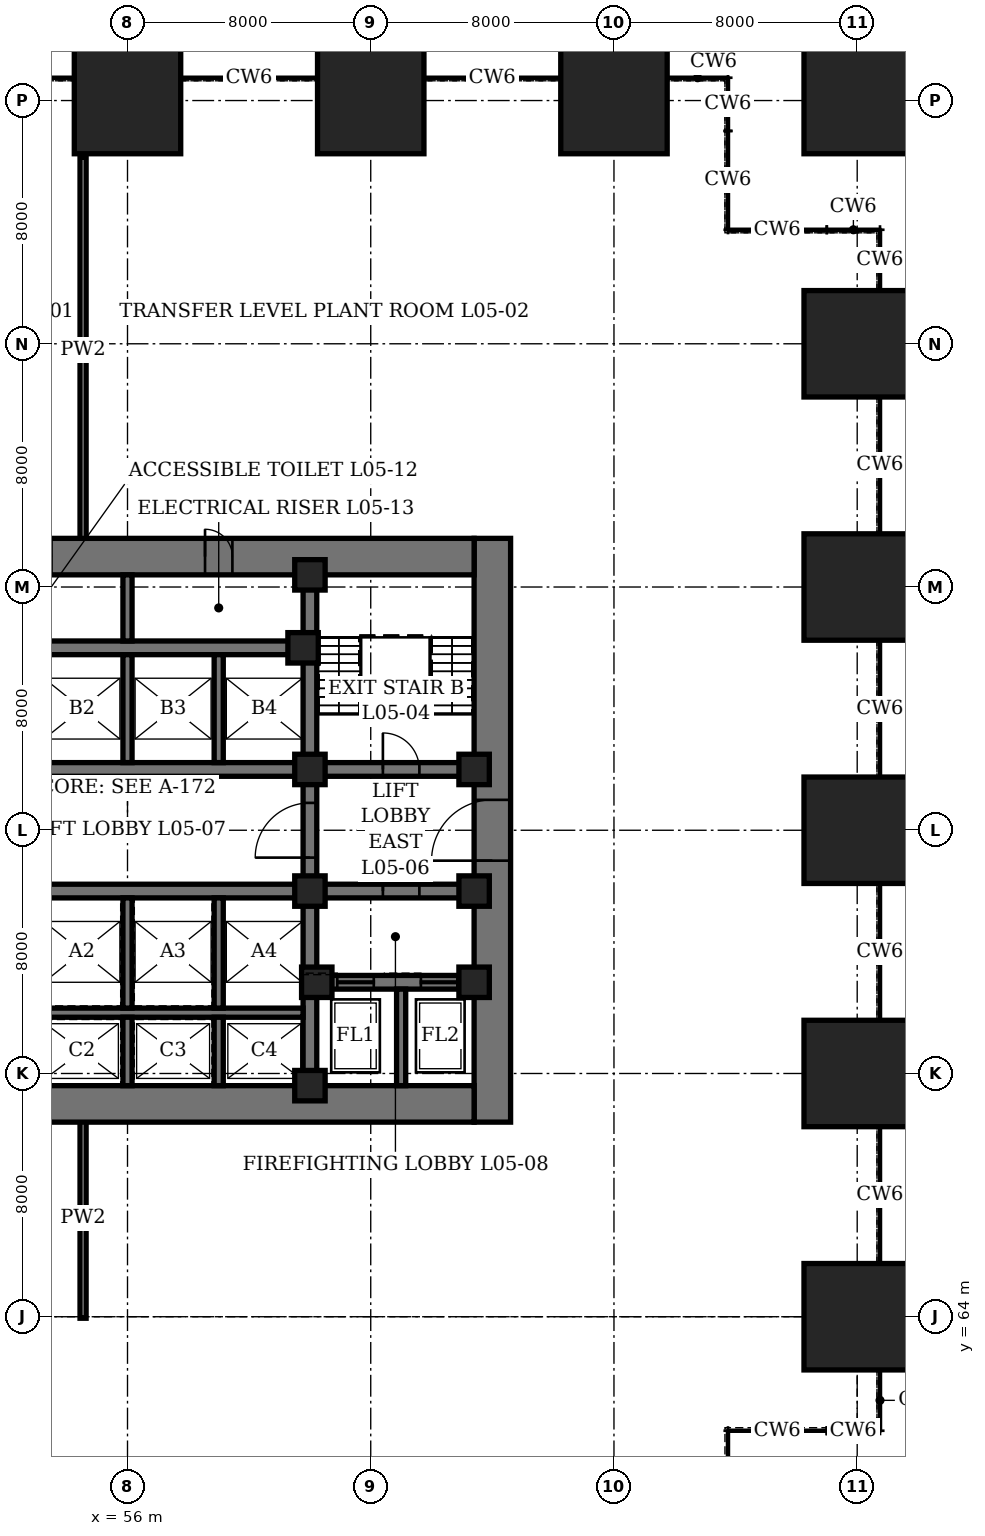
"""IFC4 building model, lengths in metres.
Left out: names, types, materials, properties, quantities, classifications, styles, units other than length and angle.
Written with IfcOpenShell. Run it as: python <this file> out.ifc"""

import sys

from ifc_helpers import new_model, si_unit, direction, frame, frame_2d, origin, origin_2d, place, context, subcontext, project, spatial, rectangle, hollow_rectangle, extrude, element, fill, save


model = new_model("IFC4")
c1 = context("Model", 3, precision=1e-05, world=origin(), true_north=direction((0.0, 1.0)))
c2 = subcontext(c1, "Body", "Model", "MODEL_VIEW")
j1 = project(units=[si_unit("LENGTHUNIT", "METRE"), si_unit("PLANEANGLEUNIT", "RADIAN")], contexts=[c1])
p1 = place(None, origin())
s1 = spatial("IfcSite", under=j1, at=p1, CompositionType="ELEMENT")
p2 = place(p1, origin())
s2 = spatial("IfcBuilding", under=s1, at=p2, CompositionType="ELEMENT")
p3 = place(p2, frame((0.0, 0.0, 25.9)))
s3 = spatial("IfcBuildingStorey", under=s2, at=p3, CompositionType="ELEMENT", Elevation=25.9)
for number, where, z_axis, x_axis in (
    (1, (56.0, 104.0, 0.0), (0.0, 0.0, 1.0), (1.0, 0.0, 0.0)),
    (2, (64.0, 104.0, 0.0), (0.0, 0.0, 1.0), (1.0, 0.0, 0.0)),
    (3, (72.0, 104.0, 0.0), (0.0, 0.0, 1.0), (1.0, 0.0, 0.0)),
    (4, (80.0, 64.0, 0.0), (0.0, 0.0, 1.0), (1.0, 0.0, 0.0)),
    (5, (80.0, 72.0, 0.0), (0.0, 0.0, 1.0), (1.0, 0.0, 0.0)),
    (6, (80.0, 80.0, 0.0), (0.0, 0.0, 1.0), (1.0, 0.0, 0.0)),
    (7, (80.0, 88.0, 0.0), (0.0, 0.0, 1.0), (1.0, 0.0, 0.0)),
    (8, (80.0, 96.0, 0.0), (0.0, 0.0, 1.0), (1.0, 0.0, 0.0)),
    (9, (80.0, 104.0, 0.0), (0.0, 0.0, 1.0), (1.0, 0.0, 0.0)),
):
    element("IfcColumn", number, at=place(p3, frame(where, z_axis=z_axis, x_axis=x_axis)), inside=s3, PredefinedType="COLUMN", context=c2, shape_type="SweptSolid", body=[
        extrude(hollow_rectangle(XDim=3.5, YDim=3.5, WallThickness=0.5, at=origin_2d()), origin(), (0.0, 0.0, 1.0), 8.7),
    ])
p4 = place(p3, frame((68.0, 70.4, 0.0), z_axis=(0.0, 0.0, 1.0), x_axis=(0.0, 1.0, 0.0)))
e10 = element("IfcWall", 10, at=p4, inside=s3, PredefinedType="SHEAR", context=c2, shape_type="SweptSolid", body=[
    extrude(rectangle(XDim=19.2, YDim=1.2, at=frame_2d((9.6, 0.0))), origin(), (0.0, 0.0, 1.0), 9.0),
])
p5 = place(p4, frame((8.6, 0.0, 0.0)))
e11 = element("IfcOpeningElement", 11, at=p5, cuts=e10, PredefinedType="OPENING", context=c2, shape_type="SweptSolid", body=[
    extrude(rectangle(XDim=2.0, YDim=2.4, at=frame_2d((1.0, 1.2))), frame((0.0, 0.61, 0.0), z_axis=(0.0, -1.0, 0.0), x_axis=(1.0, 0.0, 0.0)), (0.0, 0.0, 1.0), 1.22),
])
p6 = place(p3, frame((44.6, 71.0, 0.0), z_axis=(0.0, 0.0, 1.0), x_axis=(1.0, 0.0, 0.0)))
e12 = element("IfcWall", 12, at=p6, inside=s3, PredefinedType="SHEAR", context=c2, shape_type="SweptSolid", body=[
    extrude(rectangle(XDim=22.8, YDim=1.2, at=frame_2d((11.4, 0.0))), origin(), (0.0, 0.0, 1.0), 9.0),
])
p7 = place(p3, frame((44.6, 89.0, 0.0), z_axis=(0.0, 0.0, 1.0), x_axis=(1.0, 0.0, 0.0)))
e13 = element("IfcWall", 13, at=p7, inside=s3, PredefinedType="SHEAR", context=c2, shape_type="SweptSolid", body=[
    extrude(rectangle(XDim=22.8, YDim=1.2, at=frame_2d((11.4, 0.0))), origin(), (0.0, 0.0, 1.0), 9.0),
])
p8 = place(p7, frame((7.9, 0.0, 0.0)))
e14 = element("IfcOpeningElement", 14, at=p8, cuts=e13, PredefinedType="OPENING", context=c2, shape_type="SweptSolid", body=[
    extrude(rectangle(XDim=1.0, YDim=2.1, at=frame_2d((0.5, 1.05))), frame((0.0, 0.61, 0.0), z_axis=(0.0, -1.0, 0.0), x_axis=(1.0, 0.0, 0.0)), (0.0, 0.0, 1.0), 1.22),
])
p9 = place(p7, frame((13.95, 0.0, 0.0)))
e15 = element("IfcOpeningElement", 15, at=p9, cuts=e13, PredefinedType="OPENING", context=c2, shape_type="SweptSolid", body=[
    extrude(rectangle(XDim=0.9, YDim=2.1, at=frame_2d((0.45, 1.05))), frame((0.0, 0.61, 0.0), z_axis=(0.0, -1.0, 0.0), x_axis=(1.0, 0.0, 0.0)), (0.0, 0.0, 1.0), 1.22),
])
p10 = place(p3, frame((62.0, 71.6, 0.0), z_axis=(0.0, 0.0, 1.0), x_axis=(0.0, 1.0, 0.0)))
e16 = element("IfcWall", 16, at=p10, inside=s3, PredefinedType="SHEAR", context=c2, shape_type="SweptSolid", body=[
    extrude(rectangle(XDim=16.8, YDim=0.45, at=frame_2d((8.4, 0.0))), origin(), (0.0, 0.0, 1.0), 9.0),
])
p11 = place(p10, frame((7.5, 0.0, 0.0)))
e17 = element("IfcOpeningElement", 17, at=p11, cuts=e16, PredefinedType="OPENING", context=c2, shape_type="SweptSolid", body=[
    extrude(rectangle(XDim=1.8, YDim=2.4, at=frame_2d((0.9, 1.2))), frame((0.0, 0.235, 0.0), z_axis=(0.0, -1.0, 0.0), x_axis=(1.0, 0.0, 0.0)), (0.0, 0.0, 1.0), 0.47),
])
p12 = place(p3, frame((62.225, 75.0, 0.0), z_axis=(0.0, 0.0, 1.0), x_axis=(1.0, 0.0, 0.0)))
e18 = element("IfcWall", 18, at=p12, inside=s3, PredefinedType="SHEAR", context=c2, shape_type="SweptSolid", body=[
    extrude(rectangle(XDim=5.175, YDim=0.45, at=frame_2d((2.587, 0.0))), origin(), (0.0, 0.0, 1.0), 9.0),
])
p13 = place(p12, frame((0.675, 0.0, 0.0)))
e19 = element("IfcOpeningElement", 19, at=p13, cuts=e18, PredefinedType="OPENING", context=c2, shape_type="SweptSolid", body=[
    extrude(rectangle(XDim=1.2, YDim=2.2, at=frame_2d((0.6, 1.1))), frame((0.0, 0.235, 0.0), z_axis=(0.0, -1.0, 0.0), x_axis=(1.0, 0.0, 0.0)), (0.0, 0.0, 1.0), 0.47),
])
p14 = place(p12, frame((3.425, 0.0, 0.0)))
e20 = element("IfcOpeningElement", 20, at=p14, cuts=e18, PredefinedType="OPENING", context=c2, shape_type="SweptSolid", body=[
    extrude(rectangle(XDim=1.2, YDim=2.2, at=frame_2d((0.6, 1.1))), frame((0.0, 0.235, 0.0), z_axis=(0.0, -1.0, 0.0), x_axis=(1.0, 0.0, 0.0)), (0.0, 0.0, 1.0), 0.47),
])
p15 = place(p3, frame((62.225, 78.0, 0.0), z_axis=(0.0, 0.0, 1.0), x_axis=(1.0, 0.0, 0.0)))
e21 = element("IfcWall", 21, at=p15, inside=s3, PredefinedType="SHEAR", context=c2, shape_type="SweptSolid", body=[
    extrude(rectangle(XDim=5.175, YDim=0.45, at=frame_2d((2.587, 0.0))), origin(), (0.0, 0.0, 1.0), 9.0),
])
p16 = place(p15, frame((2.175, 0.0, 0.0)))
e22 = element("IfcOpeningElement", 22, at=p16, cuts=e21, PredefinedType="OPENING", context=c2, shape_type="SweptSolid", body=[
    extrude(rectangle(XDim=1.2, YDim=2.1, at=frame_2d((0.6, 1.05))), frame((0.0, 0.235, 0.0), z_axis=(0.0, -1.0, 0.0), x_axis=(1.0, 0.0, 0.0)), (0.0, 0.0, 1.0), 0.47),
])
p17 = place(p3, frame((62.225, 82.0, 0.0), z_axis=(0.0, 0.0, 1.0), x_axis=(1.0, 0.0, 0.0)))
e23 = element("IfcWall", 23, at=p17, inside=s3, PredefinedType="SHEAR", context=c2, shape_type="SweptSolid", body=[
    extrude(rectangle(XDim=5.175, YDim=0.45, at=frame_2d((2.587, 0.0))), origin(), (0.0, 0.0, 1.0), 9.0),
])
p18 = place(p17, frame((2.175, 0.0, 0.0)))
e24 = element("IfcOpeningElement", 24, at=p18, cuts=e23, PredefinedType="OPENING", context=c2, shape_type="SweptSolid", body=[
    extrude(rectangle(XDim=1.2, YDim=2.1, at=frame_2d((0.6, 1.05))), frame((0.0, 0.235, 0.0), z_axis=(0.0, -1.0, 0.0), x_axis=(1.0, 0.0, 0.0)), (0.0, 0.0, 1.0), 0.47),
])
for number, where, z_axis, x_axis in (
    (25, (50.225, 78.0, 0.0), (0.0, 0.0, 1.0), (1.0, 0.0, 0.0)),
    (26, (50.225, 82.0, 0.0), (0.0, 0.0, 1.0), (1.0, 0.0, 0.0)),
    (27, (50.225, 86.0, 0.0), (0.0, 0.0, 1.0), (1.0, 0.0, 0.0)),
):
    element("IfcWall", number, at=place(p3, frame(where, z_axis=z_axis, x_axis=x_axis)), inside=s3, PredefinedType="SHEAR", context=c2, shape_type="SweptSolid", body=[
        extrude(rectangle(XDim=11.55, YDim=0.45, at=frame_2d((5.775, 0.0))), origin(), (0.0, 0.0, 1.0), 9.0),
    ])
p19 = place(p3, frame((50.225, 74.0, 0.0), z_axis=(0.0, 0.0, 1.0), x_axis=(1.0, 0.0, 0.0)))
e28 = element("IfcWall", 28, at=p19, inside=s3, PredefinedType="SHEAR", context=c2, shape_type="SweptSolid", body=[
    extrude(rectangle(XDim=11.55, YDim=0.3, at=frame_2d((5.775, 0.0))), origin(), (0.0, 0.0, 1.0), 9.0),
])
p20 = place(p3, frame((56.0, 71.6, 0.0), z_axis=(0.0, 0.0, 1.0), x_axis=(0.0, 1.0, 0.0)))
e29 = element("IfcWall", 29, at=p20, inside=s3, PredefinedType="SHEAR", context=c2, shape_type="SweptSolid", body=[
    extrude(rectangle(XDim=2.25, YDim=0.3, at=frame_2d((1.125, 0.0))), origin(), (0.0, 0.0, 1.0), 9.0),
])
p21 = place(p3, frame((56.0, 74.15, 0.0), z_axis=(0.0, 0.0, 1.0), x_axis=(0.0, 1.0, 0.0)))
e30 = element("IfcWall", 30, at=p21, inside=s3, PredefinedType="SHEAR", context=c2, shape_type="SweptSolid", body=[
    extrude(rectangle(XDim=3.625, YDim=0.3, at=frame_2d((1.812, 0.0))), origin(), (0.0, 0.0, 1.0), 9.0),
])
p22 = place(p3, frame((56.0, 82.225, 0.0), z_axis=(0.0, 0.0, 1.0), x_axis=(0.0, 1.0, 0.0)))
e31 = element("IfcWall", 31, at=p22, inside=s3, PredefinedType="SHEAR", context=c2, shape_type="SweptSolid", body=[
    extrude(rectangle(XDim=3.55, YDim=0.3, at=frame_2d((1.775, 0.0))), origin(), (0.0, 0.0, 1.0), 9.0),
])
p23 = place(p3, frame((59.0, 71.6, 0.0), z_axis=(0.0, 0.0, 1.0), x_axis=(0.0, 1.0, 0.0)))
e32 = element("IfcWall", 32, at=p23, inside=s3, PredefinedType="SHEAR", context=c2, shape_type="SweptSolid", body=[
    extrude(rectangle(XDim=2.25, YDim=0.3, at=frame_2d((1.125, 0.0))), origin(), (0.0, 0.0, 1.0), 9.0),
])
p24 = place(p3, frame((59.0, 74.15, 0.0), z_axis=(0.0, 0.0, 1.0), x_axis=(0.0, 1.0, 0.0)))
e33 = element("IfcWall", 33, at=p24, inside=s3, PredefinedType="SHEAR", context=c2, shape_type="SweptSolid", body=[
    extrude(rectangle(XDim=3.625, YDim=0.3, at=frame_2d((1.812, 0.0))), origin(), (0.0, 0.0, 1.0), 9.0),
])
p25 = place(p3, frame((59.0, 82.225, 0.0), z_axis=(0.0, 0.0, 1.0), x_axis=(0.0, 1.0, 0.0)))
e34 = element("IfcWall", 34, at=p25, inside=s3, PredefinedType="SHEAR", context=c2, shape_type="SweptSolid", body=[
    extrude(rectangle(XDim=3.55, YDim=0.3, at=frame_2d((1.775, 0.0))), origin(), (0.0, 0.0, 1.0), 9.0),
])
p26 = place(p3, frame((65.0, 71.6, 0.0), z_axis=(0.0, 0.0, 1.0), x_axis=(0.0, 1.0, 0.0)))
e35 = element("IfcWall", 35, at=p26, inside=s3, PredefinedType="SHEAR", context=c2, shape_type="SweptSolid", body=[
    extrude(rectangle(XDim=3.175, YDim=0.3, at=frame_2d((1.587, 0.0))), origin(), (0.0, 0.0, 1.0), 9.0),
])
p27 = place(p3, frame((56.0, 86.225, 0.0), z_axis=(0.0, 0.0, 1.0), x_axis=(0.0, 1.0, 0.0)))
e36 = element("IfcWall", 36, at=p27, inside=s3, PredefinedType="SHEAR", context=c2, shape_type="SweptSolid", body=[
    extrude(rectangle(XDim=2.175, YDim=0.3, at=frame_2d((1.087, 0.0))), origin(), (0.0, 0.0, 1.0), 9.0),
])
for number, where, z_axis, x_axis in (
    (37, (61.775, 86.0, 0.0), (0.0, 0.0, 1.0), (1.0, 0.0, 0.0)),
    (38, (62.0, 71.6, 0.0), (0.0, 0.0, 1.0), (1.0, 0.0, 0.0)),
    (39, (62.0, 78.0, 0.0), (0.0, 0.0, 1.0), (1.0, 0.0, 0.0)),
    (40, (62.0, 82.0, 0.0), (0.0, 0.0, 1.0), (1.0, 0.0, 0.0)),
    (41, (62.0, 88.4, 0.0), (0.0, 0.0, 1.0), (1.0, 0.0, 0.0)),
    (42, (62.225, 75.0, 0.0), (0.0, 0.0, 1.0), (1.0, 0.0, 0.0)),
    (43, (67.4, 75.0, 0.0), (0.0, 0.0, 1.0), (1.0, 0.0, 0.0)),
    (44, (67.4, 78.0, 0.0), (0.0, 0.0, 1.0), (1.0, 0.0, 0.0)),
    (45, (67.4, 82.0, 0.0), (0.0, 0.0, 1.0), (1.0, 0.0, 0.0)),
):
    element("IfcColumn", number, at=place(p3, frame(where, z_axis=z_axis, x_axis=x_axis)), inside=s3, PredefinedType="COLUMN", context=c2, shape_type="SweptSolid", body=[
        extrude(hollow_rectangle(XDim=1.0, YDim=1.0, WallThickness=0.15, at=origin_2d()), origin(), (0.0, 0.0, 1.0), 9.0),
    ])
p28 = place(p3, frame((54.539, 89.45, 0.0), z_axis=(0.0, 0.0, 1.0), x_axis=(0.0, 1.0, 0.0)))
e46 = element("IfcWall", 46, at=p28, inside=s3, PredefinedType="PARTITIONING", context=c2, shape_type="SweptSolid", body=[
    extrude(rectangle(XDim=12.7, YDim=0.2, at=frame_2d((6.35, 0.0))), origin(), (0.0, 0.0, 1.0), 7.928),
])
p29 = place(p3, frame((54.539, 63.95, 0.0), z_axis=(0.0, 0.0, 1.0), x_axis=(0.0, 1.0, 0.0)))
e47 = element("IfcWall", 47, at=p29, inside=s3, PredefinedType="PARTITIONING", context=c2, shape_type="SweptSolid", body=[
    extrude(rectangle(XDim=6.6, YDim=0.2, at=frame_2d((3.3, 0.0))), origin(), (0.0, 0.0, 1.0), 7.928),
])
p30 = place(p9, origin())
e48 = element("IfcDoor", 48, at=p30, inside=s3, OperationType="SINGLE_SWING_LEFT", PredefinedType="DOOR", context=c2, shape_type="SweptSolid", body=[
    extrude(rectangle(XDim=0.9, YDim=2.1, at=frame_2d((0.45, 1.05))), frame((0.0, 0.35, 0.0), z_axis=(0.0, -1.0, 0.0), x_axis=(1.0, 0.0, 0.0)), (0.0, 0.0, 1.0), 0.7),
])
fill(e15, e48)
p31 = place(p18, origin())
e49 = element("IfcDoor", 49, at=p31, inside=s3, OperationType="SINGLE_SWING_LEFT", PredefinedType="DOOR", context=c2, shape_type="SweptSolid", body=[
    extrude(rectangle(XDim=1.2, YDim=2.1, at=frame_2d((0.6, 1.05))), frame((0.0, 0.225, 0.0), z_axis=(0.0, -1.0, 0.0), x_axis=(1.0, 0.0, 0.0)), (0.0, 0.0, 1.0), 0.449),
])
fill(e24, e49)
p32 = place(p5, origin())
e50 = element("IfcDoor", 50, at=p32, inside=s3, OperationType="DOUBLE_DOOR_SINGLE_SWING", PredefinedType="DOOR", context=c2, shape_type="SweptSolid", body=[
    extrude(rectangle(XDim=2.0, YDim=2.4, at=frame_2d((1.0, 1.2))), frame((0.0, 0.35, 0.0), z_axis=(0.0, -1.0, 0.0), x_axis=(1.0, 0.0, 0.0)), (0.0, 0.0, 1.0), 0.7),
])
fill(e11, e50)
p33 = place(p11, origin())
e51 = element("IfcDoor", 51, at=p33, inside=s3, OperationType="DOUBLE_DOOR_SINGLE_SWING", PredefinedType="DOOR", context=c2, shape_type="SweptSolid", body=[
    extrude(rectangle(XDim=1.8, YDim=2.4, at=frame_2d((0.9, 1.2))), frame((0.0, 0.225, 0.0), z_axis=(0.0, -1.0, 0.0), x_axis=(1.0, 0.0, 0.0)), (0.0, 0.0, 1.0), 0.449),
])
fill(e17, e51)
p34 = place(p16, origin())
e52 = element("IfcDoor", 52, at=p34, inside=s3, OperationType="SINGLE_SWING_RIGHT", PredefinedType="DOOR", context=c2, shape_type="SweptSolid", body=[
    extrude(rectangle(XDim=1.2, YDim=2.1, at=frame_2d((0.6, 1.05))), frame((0.0, 0.225, 0.0), z_axis=(0.0, -1.0, 0.0), x_axis=(1.0, 0.0, 0.0)), (0.0, 0.0, 1.0), 0.449),
])
fill(e22, e52)
p35 = place(p13, origin())
e53 = element("IfcDoor", 53, at=p35, inside=s3, OperationType="SLIDING_TO_LEFT", PredefinedType="DOOR", context=c2, shape_type="SweptSolid", body=[
    extrude(rectangle(XDim=1.2, YDim=2.2, at=frame_2d((0.6, 1.1))), frame((0.0, 0.225, 0.0), z_axis=(0.0, -1.0, 0.0), x_axis=(1.0, 0.0, 0.0)), (0.0, 0.0, 1.0), 0.449),
])
fill(e19, e53)
p36 = place(p14, origin())
e54 = element("IfcDoor", 54, at=p36, inside=s3, OperationType="SLIDING_TO_LEFT", PredefinedType="DOOR", context=c2, shape_type="SweptSolid", body=[
    extrude(rectangle(XDim=1.2, YDim=2.2, at=frame_2d((0.6, 1.1))), frame((0.0, 0.225, 0.0), z_axis=(0.0, -1.0, 0.0), x_axis=(1.0, 0.0, 0.0)), (0.0, 0.0, 1.0), 0.449),
])
fill(e20, e54)
save(model, sys.argv[1])
